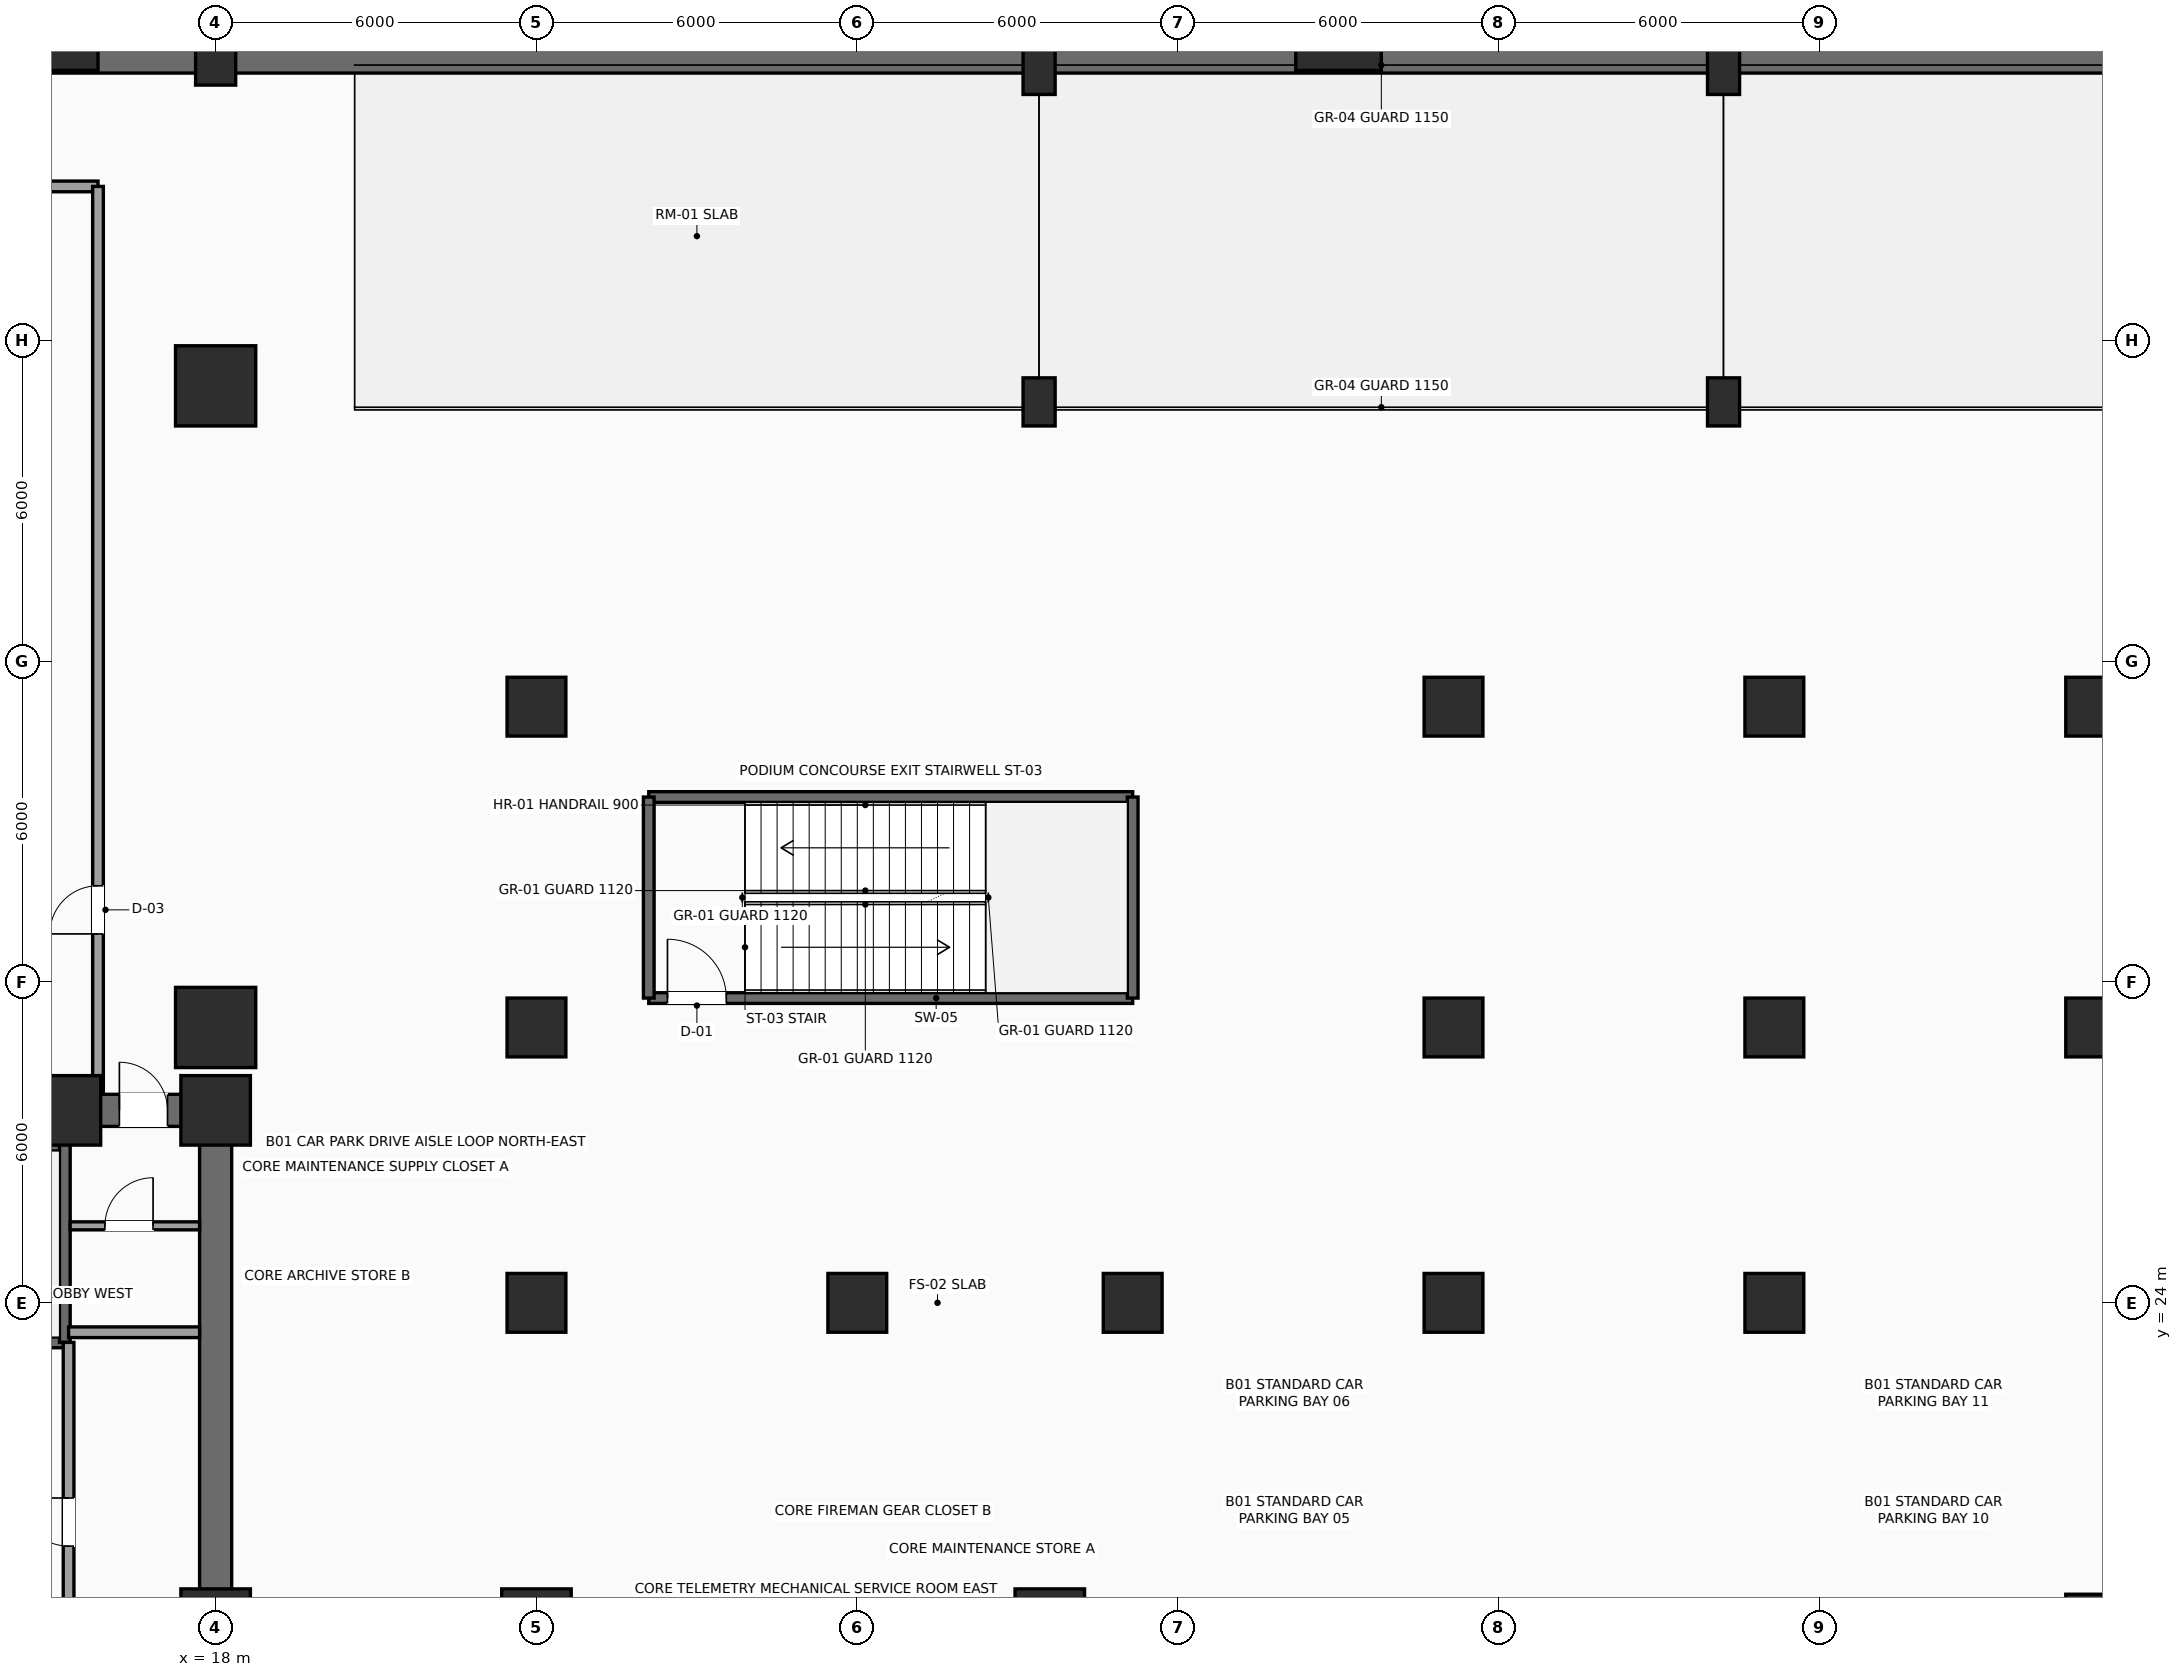
"""IFC4 building model, lengths in metres.
Left out: names, types, materials, properties, quantities, classifications, styles, units other than length and angle.
Written with IfcOpenShell. Run it as: python <this file> out.ifc"""

import sys

from ifc_helpers import new_model, si_unit, direction, frame, frame_2d, origin, origin_2d, place, context, subcontext, project, spatial, rectangle, hollow_rectangle, extrude, element, fill, save


model = new_model("IFC4")
c1 = context("Model", 3, precision=1e-05, world=origin(), true_north=direction((0.0, 1.0)))
c2 = subcontext(c1, "Body", "Model", "MODEL_VIEW")
j1 = project(units=[si_unit("LENGTHUNIT", "METRE"), si_unit("PLANEANGLEUNIT", "RADIAN")], contexts=[c1])
p1 = place(None, origin())
s1 = spatial("IfcSite", under=j1, at=p1, CompositionType="ELEMENT")
p2 = place(p1, origin())
s2 = spatial("IfcBuilding", under=s1, at=p2, CompositionType="ELEMENT")
p3 = place(p2, frame((0.0, 0.0, -4.8)))
s3 = spatial("IfcBuildingStorey", under=s2, at=p3, CompositionType="ELEMENT", Elevation=-4.8)
for number, where, z_axis, x_axis in (
    (1, (18.0, 18.0, 0.0), (0.0, 0.0, 1.0), (1.0, 0.0, 0.0)),
    (2, (15.2, 27.6, 0.0), (0.0, 0.0, 1.0), (1.0, 0.0, 0.0)),
    (3, (18.0, 27.6, 0.0), (0.0, 0.0, 1.0), (1.0, 0.0, 0.0)),
    (4, (24.0, 18.0, 0.0), (0.0, 0.0, 1.0), (1.0, 0.0, 0.0)),
    (5, (33.6, 18.0, 0.0), (0.0, 0.0, 1.0), (1.0, 0.0, 0.0)),
):
    element("IfcColumn", number, at=place(p3, frame(where, z_axis=z_axis, x_axis=x_axis)), inside=s3, PredefinedType="COLUMN", context=c2, shape_type="SweptSolid", body=[
        extrude(rectangle(XDim=1.3, YDim=1.3, at=origin_2d()), origin(), (0.0, 0.0, 1.0), 4.8),
    ])
for number, where, z_axis, x_axis in (
    (6, (18.0, 29.15, 0.0), (0.0, 0.0, 1.0), (1.0, 0.0, 0.0)),
    (7, (18.0, 41.15, 0.0), (0.0, 0.0, 1.0), (1.0, 0.0, 0.0)),
):
    element("IfcColumn", number, at=place(p3, frame(where, z_axis=z_axis, x_axis=x_axis)), inside=s3, PredefinedType="COLUMN", context=c2, shape_type="SweptSolid", body=[
        extrude(rectangle(XDim=1.5, YDim=1.5, at=origin_2d()), origin(), (0.0, 0.0, 1.0), 4.8),
    ])
p4 = place(p3, frame((18.0, 47.15, 0.0), z_axis=(0.0, 0.0, 1.0), x_axis=(1.0, 0.0, 0.0)))
e8 = element("IfcColumn", 8, at=p4, inside=s3, PredefinedType="COLUMN", context=c2, shape_type="SweptSolid", body=[
    extrude(hollow_rectangle(XDim=0.75, YDim=0.75, WallThickness=0.035, InnerFilletRadius=0.035, OuterFilletRadius=0.05, at=origin_2d()), origin(), (0.0, 0.0, 1.0), 4.8),
])
for number, where, z_axis, x_axis in (
    (9, (24.0, 24.0, 0.0), (0.0, 0.0, 1.0), (1.0, 0.0, 0.0)),
    (10, (24.0, 29.15, 0.0), (0.0, 0.0, 1.0), (1.0, 0.0, 0.0)),
    (11, (24.0, 35.15, 0.0), (0.0, 0.0, 1.0), (1.0, 0.0, 0.0)),
    (12, (30.0, 24.0, 0.0), (0.0, 0.0, 1.0), (1.0, 0.0, 0.0)),
    (13, (35.15, 24.0, 0.0), (0.0, 0.0, 1.0), (1.0, 0.0, 0.0)),
    (14, (41.15, 24.0, 0.0), (0.0, 0.0, 1.0), (1.0, 0.0, 0.0)),
    (15, (41.15, 29.15, 0.0), (0.0, 0.0, 1.0), (1.0, 0.0, 0.0)),
    (16, (41.15, 35.15, 0.0), (0.0, 0.0, 1.0), (1.0, 0.0, 0.0)),
    (17, (47.15, 24.0, 0.0), (0.0, 0.0, 1.0), (1.0, 0.0, 0.0)),
    (18, (47.15, 29.15, 0.0), (0.0, 0.0, 1.0), (1.0, 0.0, 0.0)),
    (19, (47.15, 35.15, 0.0), (0.0, 0.0, 1.0), (1.0, 0.0, 0.0)),
    (20, (53.15, 29.15, 0.0), (0.0, 0.0, 1.0), (1.0, 0.0, 0.0)),
    (21, (53.15, 35.15, 0.0), (0.0, 0.0, 1.0), (1.0, 0.0, 0.0)),
):
    element("IfcColumn", number, at=place(p3, frame(where, z_axis=z_axis, x_axis=x_axis)), inside=s3, PredefinedType="COLUMN", context=c2, shape_type="SweptSolid", body=[
        extrude(rectangle(XDim=1.1, YDim=1.1, at=origin_2d()), origin(), (0.0, 0.0, 1.0), 4.8),
    ])
for number, where, z_axis, x_axis in (
    (22, (15.0, 47.45, 0.0), (0.0, 0.0, 1.0), (0.0, 1.0, 0.0)),
    (23, (39.0, 47.45, 0.0), (0.0, 0.0, 1.0), (0.0, 1.0, 0.0)),
):
    element("IfcColumn", number, at=place(p3, frame(where, z_axis=z_axis, x_axis=x_axis)), inside=s3, PredefinedType="COLUMN", context=c2, shape_type="SweptSolid", body=[
        extrude(rectangle(XDim=0.8, YDim=1.6, at=origin_2d()), origin(), (0.0, 0.0, 1.0), 4.8),
    ])
p5 = place(p3, frame((53.15, 18.0, 0.0), z_axis=(0.0, 0.0, 1.0), x_axis=(1.0, 0.0, 0.0)))
e24 = element("IfcColumn", 24, at=p5, inside=s3, PredefinedType="COLUMN", context=c2, shape_type="SweptSolid", body=[
    extrude(rectangle(XDim=1.1, YDim=1.1, at=origin_2d()), origin(), (0.0, 0.0, 1.0), 4.8),
])
for number, where, z_axis, x_axis in (
    (25, (33.4, 40.85, 0.0), (0.0, 0.0, 1.0), (1.0, 0.0, 0.0)),
    (26, (33.4, 47.05, 0.0), (0.0, 0.0, 1.0), (1.0, 0.0, 0.0)),
):
    element("IfcColumn", number, at=place(p3, frame(where, z_axis=z_axis, x_axis=x_axis)), inside=s3, PredefinedType="COLUMN", context=c2, shape_type="SweptSolid", body=[
        extrude(rectangle(XDim=0.6, YDim=0.9, at=origin_2d()), origin(), (0.0, 0.0, 1.0), 1.32),
    ])
for number, where, z_axis, x_axis in (
    (27, (46.2, 40.85, 0.0), (0.0, 0.0, 1.0), (1.0, 0.0, 0.0)),
    (28, (46.2, 47.05, 0.0), (0.0, 0.0, 1.0), (1.0, 0.0, 0.0)),
):
    element("IfcColumn", number, at=place(p3, frame(where, z_axis=z_axis, x_axis=x_axis)), inside=s3, PredefinedType="COLUMN", context=c2, shape_type="SweptSolid", body=[
        extrude(rectangle(XDim=0.6, YDim=0.9, at=origin_2d()), origin(), (0.0, 0.0, 1.0), 2.92),
    ])
p6 = place(p3, frame((3.0, 47.5, 0.0), z_axis=(0.0, 0.0, 1.0), x_axis=(1.0, 0.0, 0.0)))
e29 = element("IfcWall", 29, at=p6, inside=s3, PredefinedType="USERDEFINED", context=c2, shape_type="SweptSolid", body=[
    extrude(rectangle(XDim=57.0, YDim=1.0, at=frame_2d((28.5, 0.0))), origin(), (0.0, 0.0, 1.0), 4.45),
])
p7 = place(p3, frame((6.0, 27.6, 0.0), z_axis=(0.0, 0.0, 1.0), x_axis=(1.0, 0.0, 0.0)))
e30 = element("IfcWall", 30, at=p7, inside=s3, PredefinedType="SHEAR", context=c2, shape_type="SweptSolid", body=[
    extrude(rectangle(XDim=12.0, YDim=0.6, at=frame_2d((6.0, 0.0))), origin(), (0.0, 0.0, 1.0), 4.45),
])
p8 = place(p7, frame((10.2, 0.0, 0.0)))
e31 = element("IfcOpeningElement", 31, at=p8, cuts=e30, PredefinedType="OPENING", context=c2, shape_type="SweptSolid", body=[
    extrude(rectangle(XDim=0.9, YDim=2.15, at=frame_2d((0.45, 1.075))), frame((0.0, 0.31, 0.0), z_axis=(0.0, -1.0, 0.0), x_axis=(1.0, 0.0, 0.0)), (0.0, 0.0, 1.0), 0.62),
])
p9 = place(p3, frame((18.0, 18.0, 0.0), z_axis=(0.0, 0.0, 1.0), x_axis=(0.0, 1.0, 0.0)))
e32 = element("IfcWall", 32, at=p9, inside=s3, PredefinedType="SHEAR", context=c2, shape_type="SweptSolid", body=[
    extrude(rectangle(XDim=9.6, YDim=0.6, at=frame_2d((4.8, 0.0))), origin(), (0.0, 0.0, 1.0), 4.45),
])
p10 = place(p3, frame((6.3, 23.26, 0.0), z_axis=(0.0, 0.0, 1.0), x_axis=(1.0, 0.0, 0.0)))
e33 = element("IfcWall", 33, at=p10, inside=s3, PredefinedType="SHEAR", context=c2, shape_type="SweptSolid", body=[
    extrude(rectangle(XDim=8.88, YDim=0.2, at=frame_2d((4.44, 0.0))), origin(), (0.0, 0.0, 1.0), 4.45),
])
p11 = place(p10, frame((0.35, 0.0, 0.0)))
e34 = element("IfcOpeningElement", 34, at=p11, cuts=e33, PredefinedType="OPENING", context=c2, shape_type="SweptSolid", body=[
    extrude(rectangle(XDim=1.1, YDim=2.2, at=frame_2d((0.55, 1.1))), frame((0.0, 0.11, 0.0), z_axis=(0.0, -1.0, 0.0), x_axis=(1.0, 0.0, 0.0)), (0.0, 0.0, 1.0), 0.22),
])
p12 = place(p3, frame((6.3, 26.94, 0.0), z_axis=(0.0, 0.0, 1.0), x_axis=(1.0, 0.0, 0.0)))
e35 = element("IfcWall", 35, at=p12, inside=s3, PredefinedType="SHEAR", context=c2, shape_type="SweptSolid", body=[
    extrude(rectangle(XDim=8.88, YDim=0.2, at=frame_2d((4.44, 0.0))), origin(), (0.0, 0.0, 1.0), 4.45),
])
p13 = place(p3, frame((15.18, 23.26, 0.0), z_axis=(0.0, 0.0, 1.0), x_axis=(0.0, 1.0, 0.0)))
e36 = element("IfcWall", 36, at=p13, inside=s3, PredefinedType="SHEAR", context=c2, shape_type="SweptSolid", body=[
    extrude(rectangle(XDim=4.04, YDim=0.2, at=frame_2d((2.02, 0.0))), origin(), (0.0, 0.0, 1.0), 4.45),
])
p14 = place(p3, frame((15.25, 18.25, 0.0), z_axis=(0.0, 0.0, 1.0), x_axis=(0.0, 1.0, 0.0)))
e37 = element("IfcWall", 37, at=p14, inside=s3, PredefinedType="SOLIDWALL", context=c2, shape_type="SweptSolid", body=[
    extrude(rectangle(XDim=5.01, YDim=0.2, at=frame_2d((2.505, 0.0))), origin(), (0.0, 0.0, 1.0), 4.45),
])
p15 = place(p14, frame((1.2, 0.0, 0.0)))
e38 = element("IfcOpeningElement", 38, at=p15, cuts=e37, PredefinedType="OPENING", context=c2, shape_type="SweptSolid", body=[
    extrude(rectangle(XDim=0.9, YDim=2.15, at=frame_2d((0.45, 1.075))), frame((0.0, 0.11, 0.0), z_axis=(0.0, -1.0, 0.0), x_axis=(1.0, 0.0, 0.0)), (0.0, 0.0, 1.0), 0.22),
])
p16 = place(p3, frame((15.25, 23.45, 0.0), z_axis=(0.0, 0.0, 1.0), x_axis=(1.0, 0.0, 0.0)))
e39 = element("IfcWall", 39, at=p16, inside=s3, PredefinedType="SOLIDWALL", context=c2, shape_type="SweptSolid", body=[
    extrude(rectangle(XDim=2.45, YDim=0.2, at=frame_2d((1.225, 0.0))), origin(), (0.0, 0.0, 1.0), 4.45),
])
p17 = place(p3, frame((15.28, 25.44, 0.0), z_axis=(0.0, 0.0, 1.0), x_axis=(1.0, 0.0, 0.0)))
e40 = element("IfcWall", 40, at=p17, inside=s3, PredefinedType="PARTITIONING", context=c2, shape_type="SweptSolid", body=[
    extrude(rectangle(XDim=2.42, YDim=0.15, at=frame_2d((1.21, 0.0))), origin(), (0.0, 0.0, 1.0), 4.45),
])
p18 = place(p17, frame((0.65, 0.0, 0.0)))
e41 = element("IfcOpeningElement", 41, at=p18, cuts=e40, PredefinedType="OPENING", context=c2, shape_type="SweptSolid", body=[
    extrude(rectangle(XDim=0.9, YDim=2.15, at=frame_2d((0.45, 1.075))), frame((0.0, 0.085, 0.0), z_axis=(0.0, -1.0, 0.0), x_axis=(1.0, 0.0, 0.0)), (0.0, 0.0, 1.0), 0.17),
])
p19 = place(p3, frame((26.1, 29.7, 0.0), z_axis=(0.0, 0.0, 1.0), x_axis=(1.0, 0.0, 0.0)))
e42 = element("IfcWall", 42, at=p19, inside=s3, PredefinedType="SHEAR", context=c2, shape_type="SweptSolid", body=[
    extrude(rectangle(XDim=9.05, YDim=0.2, at=frame_2d((4.525, 0.0))), origin(), (0.0, 0.0, 1.0), 4.45),
])
p20 = place(p19, frame((0.35, 0.0, 0.0)))
e43 = element("IfcOpeningElement", 43, at=p20, cuts=e42, PredefinedType="OPENING", context=c2, shape_type="SweptSolid", body=[
    extrude(rectangle(XDim=1.1, YDim=2.2, at=frame_2d((0.55, 1.1))), frame((0.0, 0.11, 0.0), z_axis=(0.0, -1.0, 0.0), x_axis=(1.0, 0.0, 0.0)), (0.0, 0.0, 1.0), 0.22),
])
p21 = place(p3, frame((26.1, 33.46, 0.0), z_axis=(0.0, 0.0, 1.0), x_axis=(1.0, 0.0, 0.0)))
e44 = element("IfcWall", 44, at=p21, inside=s3, PredefinedType="SHEAR", context=c2, shape_type="SweptSolid", body=[
    extrude(rectangle(XDim=9.05, YDim=0.2, at=frame_2d((4.525, 0.0))), origin(), (0.0, 0.0, 1.0), 4.45),
])
for number, where, z_axis, x_axis in (
    (45, (26.1, 29.7, 0.0), (0.0, 0.0, 1.0), (0.0, 1.0, 0.0)),
    (46, (35.15, 29.7, 0.0), (0.0, 0.0, 1.0), (0.0, 1.0, 0.0)),
):
    element("IfcWall", number, at=place(p3, frame(where, z_axis=z_axis, x_axis=x_axis)), inside=s3, PredefinedType="SHEAR", context=c2, shape_type="SweptSolid", body=[
        extrude(rectangle(XDim=3.76, YDim=0.2, at=frame_2d((1.88, 0.0))), origin(), (0.0, 0.0, 1.0), 4.45),
    ])
p22 = place(p3, frame((3.0, 44.88, 0.0), z_axis=(0.0, 0.0, 1.0), x_axis=(1.0, 0.0, 0.0)))
e47 = element("IfcWall", 47, at=p22, inside=s3, PredefinedType="SOLIDWALL", context=c2, shape_type="SweptSolid", body=[
    extrude(rectangle(XDim=12.8, YDim=0.2, at=frame_2d((6.4, 0.0))), origin(), (0.0, 0.0, 1.0), 4.45),
])
p23 = place(p3, frame((15.8, 27.92, 0.0), z_axis=(0.0, 0.0, 1.0), x_axis=(0.0, 1.0, 0.0)))
e48 = element("IfcWall", 48, at=p23, inside=s3, PredefinedType="SOLIDWALL", context=c2, shape_type="SweptSolid", body=[
    extrude(rectangle(XDim=16.96, YDim=0.2, at=frame_2d((8.48, 0.0))), origin(), (0.0, 0.0, 1.0), 4.45),
])
p24 = place(p23, frame((2.98, 0.0, 0.0)))
e49 = element("IfcOpeningElement", 49, at=p24, cuts=e48, PredefinedType="OPENING", context=c2, shape_type="SweptSolid", body=[
    extrude(rectangle(XDim=0.9, YDim=2.15, at=frame_2d((0.45, 1.075))), frame((0.0, 0.11, 0.0), z_axis=(0.0, -1.0, 0.0), x_axis=(1.0, 0.0, 0.0)), (0.0, 0.0, 1.0), 0.22),
])
p25 = place(p8, origin())
e50 = element("IfcDoor", 50, at=p25, inside=s3, OperationType="SINGLE_SWING_LEFT", PredefinedType="DOOR", context=c2, shape_type="SweptSolid", body=[
    extrude(rectangle(XDim=0.9, YDim=2.15, at=frame_2d((0.45, 1.075))), frame((0.0, 0.025, 0.0), z_axis=(0.0, -1.0, 0.0), x_axis=(1.0, 0.0, 0.0)), (0.0, 0.0, 1.0), 0.05),
])
fill(e31, e50)
p26 = place(p15, origin())
e51 = element("IfcDoor", 51, at=p26, inside=s3, OperationType="SINGLE_SWING_RIGHT", PredefinedType="DOOR", context=c2, shape_type="SweptSolid", body=[
    extrude(rectangle(XDim=0.9, YDim=2.15, at=frame_2d((0.45, 1.075))), frame((0.0, 0.025, 0.0), z_axis=(0.0, -1.0, 0.0), x_axis=(1.0, 0.0, 0.0)), (0.0, 0.0, 1.0), 0.05),
])
fill(e38, e51)
p27 = place(p18, origin())
e52 = element("IfcDoor", 52, at=p27, inside=s3, OperationType="SINGLE_SWING_RIGHT", PredefinedType="DOOR", context=c2, shape_type="SweptSolid", body=[
    extrude(rectangle(XDim=0.9, YDim=2.15, at=frame_2d((0.45, 1.075))), frame((0.0, 0.025, 0.0), z_axis=(0.0, -1.0, 0.0), x_axis=(1.0, 0.0, 0.0)), (0.0, 0.0, 1.0), 0.05),
])
fill(e41, e52)
p28 = place(p20, origin())
e53 = element("IfcDoor", 53, at=p28, inside=s3, OperationType="SINGLE_SWING_LEFT", PredefinedType="DOOR", context=c2, shape_type="SweptSolid", body=[
    extrude(rectangle(XDim=1.1, YDim=2.2, at=frame_2d((0.55, 1.1))), frame((0.0, 0.025, 0.0), z_axis=(0.0, -1.0, 0.0), x_axis=(1.0, 0.0, 0.0)), (0.0, 0.0, 1.0), 0.05),
])
fill(e43, e53)
p29 = place(p24, origin())
e54 = element("IfcDoor", 54, at=p29, inside=s3, OperationType="SINGLE_SWING_LEFT", PredefinedType="DOOR", context=c2, shape_type="SweptSolid", body=[
    extrude(rectangle(XDim=0.9, YDim=2.15, at=frame_2d((0.45, 1.075))), frame((0.0, 0.025, 0.0), z_axis=(0.0, -1.0, 0.0), x_axis=(1.0, 0.0, 0.0)), (0.0, 0.0, 1.0), 0.05),
])
fill(e49, e54)
save(model, sys.argv[1])
